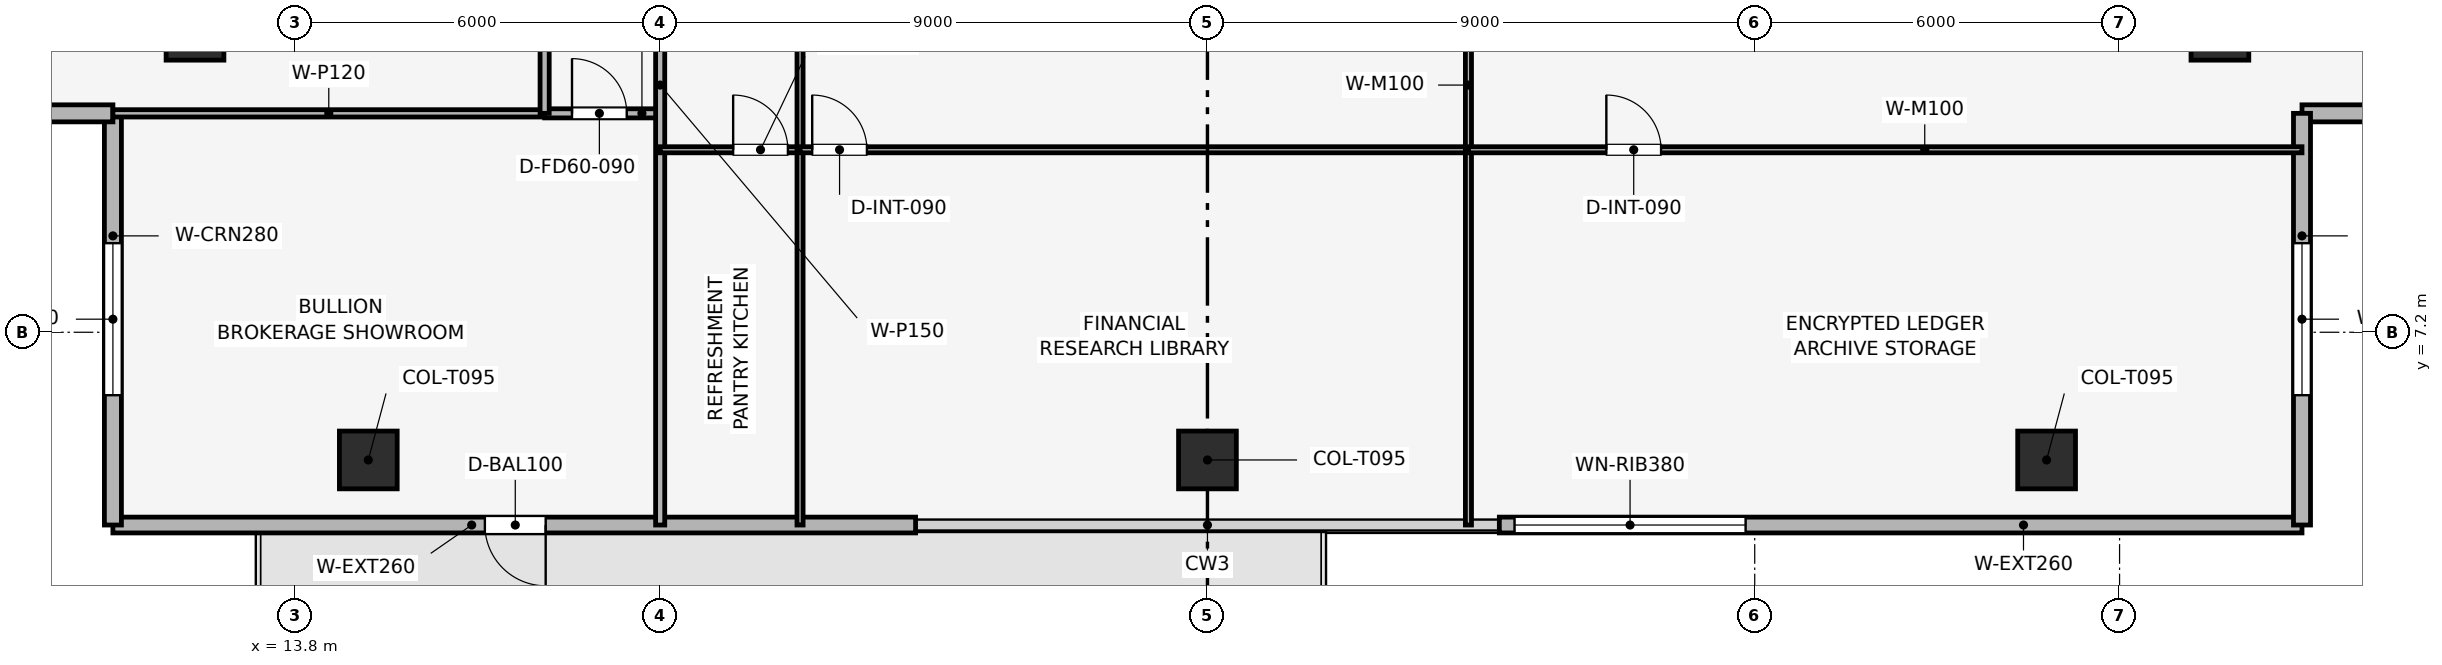
"""IFC4 building model, lengths in metres.
Left out: names, types, materials, properties, quantities, classifications, styles, units other than length and angle.
Written with IfcOpenShell. Run it as: python <this file> out.ifc"""

import sys

from ifc_helpers import new_model, si_unit, direction, frame, frame_2d, origin, origin_2d, place, context, subcontext, project, spatial, rectangle, extrude, element, fill, save


model = new_model("IFC4")
c1 = context("Model", 3, precision=1e-05, world=origin(), true_north=direction((0.0, 1.0)))
c2 = subcontext(c1, "Body", "Model", "MODEL_VIEW")
j1 = project(units=[si_unit("LENGTHUNIT", "METRE"), si_unit("PLANEANGLEUNIT", "RADIAN")], contexts=[c1])
p1 = place(None, origin())
s1 = spatial("IfcSite", under=j1, at=p1, CompositionType="ELEMENT")
p2 = place(p1, origin())
s2 = spatial("IfcBuilding", under=s1, at=p2, CompositionType="ELEMENT")
p3 = place(p2, frame((0.0, 0.0, 265.35)))
s3 = spatial("IfcBuildingStorey", under=s2, at=p3, CompositionType="ELEMENT", Elevation=265.35)
for number, where, z_axis, x_axis in (
    (1, (15.0, 5.1, 0.003), (0.0, 0.0, 1.0), (1.0, 0.0, 0.0)),
    (2, (28.8, 5.1, 0.003), (0.0, 0.0, 1.0), (1.0, 0.0, 0.0)),
    (3, (42.6, 5.1, 0.003), (0.0, 0.0, 1.0), (1.0, 0.0, 0.0)),
    (4, (12.15, 12.15, 0.003), (0.0, 0.0, 1.0), (1.0, 0.0, 0.0)),
    (5, (45.45, 12.15, 0.003), (0.0, 0.0, 1.0), (1.0, 0.0, 0.0)),
):
    element("IfcColumn", number, at=place(p3, frame(where, z_axis=z_axis, x_axis=x_axis)), inside=s3, PredefinedType="COLUMN", context=c2, shape_type="SweptSolid", body=[
        extrude(rectangle(XDim=0.95, YDim=0.95, at=origin_2d()), origin(), (0.0, 0.0, 1.0), 3.494),
    ])
p4 = place(p3, frame((46.8, 4.03, 0.0), z_axis=(0.0, 0.0, 1.0), x_axis=(-1.0, 0.0, 0.0)))
e6 = element("IfcWall", 6, at=p4, inside=s3, PredefinedType="SOLIDWALL", context=c2, shape_type="SweptSolid", body=[
    extrude(rectangle(XDim=13.2, YDim=0.26, at=frame_2d((6.6, 0.0))), origin(), (0.0, 0.0, 1.0), 3.5),
])
p5 = place(p4, frame((9.15, 0.0, 0.9)))
e7 = element("IfcOpeningElement", 7, at=p5, cuts=e6, PredefinedType="OPENING", context=c2, shape_type="SweptSolid", body=[
    extrude(rectangle(XDim=3.8, YDim=1.9, at=frame_2d((1.9, 0.95))), frame((0.0, 0.14, 0.0), z_axis=(0.0, -1.0, 0.0), x_axis=(1.0, 0.0, 0.0)), (0.0, 0.0, 1.0), 0.28),
])
p6 = place(p3, frame((24.0, 4.03, 0.0), z_axis=(0.0, 0.0, 1.0), x_axis=(-1.0, 0.0, 0.0)))
e8 = element("IfcWall", 8, at=p6, inside=s3, PredefinedType="SOLIDWALL", context=c2, shape_type="SweptSolid", body=[
    extrude(rectangle(XDim=13.2, YDim=0.26, at=frame_2d((6.6, 0.0))), origin(), (0.0, 0.0, 1.0), 3.5),
])
p7 = place(p6, frame((6.083, 0.0, 0.0)))
e9 = element("IfcOpeningElement", 9, at=p7, cuts=e8, PredefinedType="OPENING", context=c2, shape_type="SweptSolid", body=[
    extrude(rectangle(XDim=1.0, YDim=2.2, at=frame_2d((0.5, 1.1))), frame((0.0, 0.14, 0.0), z_axis=(0.0, -1.0, 0.0), x_axis=(1.0, 0.0, 0.0)), (0.0, 0.0, 1.0), 0.28),
])
p8 = place(p3, frame((10.8, 4.03, 0.0), z_axis=(0.0, 0.0, 1.0), x_axis=(0.0, 1.0, 0.0)))
e10 = element("IfcWall", 10, at=p8, inside=s3, PredefinedType="SOLIDWALL", context=c2, shape_type="SweptSolid", body=[
    extrude(rectangle(XDim=6.77, YDim=0.28, at=frame_2d((3.385, 0.0))), origin(), (0.0, 0.0, 1.0), 3.5),
])
p9 = place(p8, frame((2.135, 0.0, 0.9)))
e11 = element("IfcOpeningElement", 11, at=p9, cuts=e10, PredefinedType="OPENING", context=c2, shape_type="SweptSolid", body=[
    extrude(rectangle(XDim=2.5, YDim=1.9, at=frame_2d((1.25, 0.95))), frame((0.0, 0.15, 0.0), z_axis=(0.0, -1.0, 0.0), x_axis=(1.0, 0.0, 0.0)), (0.0, 0.0, 1.0), 0.3),
])
p10 = place(p3, frame((10.8, 10.8, 0.0), z_axis=(0.0, 0.0, 1.0), x_axis=(-1.0, 0.0, 0.0)))
e12 = element("IfcWall", 12, at=p10, inside=s3, PredefinedType="SOLIDWALL", context=c2, shape_type="SweptSolid", body=[
    extrude(rectangle(XDim=6.77, YDim=0.28, at=frame_2d((3.385, 0.0))), origin(), (0.0, 0.0, 1.0), 3.5),
])
p11 = place(p10, frame((2.135, 0.0, 0.9)))
e13 = element("IfcOpeningElement", 13, at=p11, cuts=e12, PredefinedType="OPENING", context=c2, shape_type="SweptSolid", body=[
    extrude(rectangle(XDim=2.5, YDim=1.9, at=frame_2d((1.25, 0.95))), frame((0.0, 0.15, 0.0), z_axis=(0.0, -1.0, 0.0), x_axis=(1.0, 0.0, 0.0)), (0.0, 0.0, 1.0), 0.3),
])
p12 = place(p3, frame((53.57, 10.8, 0.0), z_axis=(0.0, 0.0, 1.0), x_axis=(-1.0, 0.0, 0.0)))
e14 = element("IfcWall", 14, at=p12, inside=s3, PredefinedType="SOLIDWALL", context=c2, shape_type="SweptSolid", body=[
    extrude(rectangle(XDim=6.77, YDim=0.28, at=frame_2d((3.385, 0.0))), origin(), (0.0, 0.0, 1.0), 3.5),
])
p13 = place(p12, frame((2.135, 0.0, 0.9)))
e15 = element("IfcOpeningElement", 15, at=p13, cuts=e14, PredefinedType="OPENING", context=c2, shape_type="SweptSolid", body=[
    extrude(rectangle(XDim=2.5, YDim=1.9, at=frame_2d((1.25, 0.95))), frame((0.0, 0.15, 0.0), z_axis=(0.0, -1.0, 0.0), x_axis=(1.0, 0.0, 0.0)), (0.0, 0.0, 1.0), 0.3),
])
p14 = place(p3, frame((46.8, 10.8, 0.0), z_axis=(0.0, 0.0, 1.0), x_axis=(0.0, -1.0, 0.0)))
e16 = element("IfcWall", 16, at=p14, inside=s3, PredefinedType="SOLIDWALL", context=c2, shape_type="SweptSolid", body=[
    extrude(rectangle(XDim=6.77, YDim=0.28, at=frame_2d((3.385, 0.0))), origin(), (0.0, 0.0, 1.0), 3.5),
])
p15 = place(p14, frame((2.135, 0.0, 0.9)))
e17 = element("IfcOpeningElement", 17, at=p15, cuts=e16, PredefinedType="OPENING", context=c2, shape_type="SweptSolid", body=[
    extrude(rectangle(XDim=2.5, YDim=1.9, at=frame_2d((1.25, 0.95))), frame((0.0, 0.15, 0.0), z_axis=(0.0, -1.0, 0.0), x_axis=(1.0, 0.0, 0.0)), (0.0, 0.0, 1.0), 0.3),
])
p16 = place(p3, frame((10.8, 10.8, 0.0), z_axis=(0.0, 0.0, 1.0), x_axis=(1.0, 0.0, 0.0)))
e18 = element("IfcWall", 18, at=p16, inside=s3, PredefinedType="PARTITIONING", context=c2, shape_type="SweptSolid", body=[
    extrude(rectangle(XDim=7.1, YDim=0.12, at=frame_2d((3.55, 0.0))), origin(), (0.0, 0.0, 1.0), 3.085),
])
p17 = place(p3, frame((17.9, 10.8, 0.0), z_axis=(0.0, 0.0, 1.0), x_axis=(1.0, 0.0, 0.0)))
e19 = element("IfcWall", 19, at=p17, inside=s3, PredefinedType="PARTITIONING", context=c2, shape_type="SweptSolid", body=[
    extrude(rectangle(XDim=1.9, YDim=0.15, at=frame_2d((0.95, 0.0))), origin(), (0.0, 0.0, 1.0), 3.5),
])
p18 = place(p17, frame((0.45, 0.0, 0.0)))
e20 = element("IfcOpeningElement", 20, at=p18, cuts=e19, PredefinedType="OPENING", context=c2, shape_type="SweptSolid", body=[
    extrude(rectangle(XDim=0.9, YDim=2.1, at=frame_2d((0.45, 1.05))), frame((0.0, 0.085, 0.0), z_axis=(0.0, -1.0, 0.0), x_axis=(1.0, 0.0, 0.0)), (0.0, 0.0, 1.0), 0.17),
])
p19 = place(p3, frame((19.8, 4.03, 0.0), z_axis=(0.0, 0.0, 1.0), x_axis=(0.0, 1.0, 0.0)))
e21 = element("IfcWall", 21, at=p19, inside=s3, PredefinedType="PARTITIONING", context=c2, shape_type="SweptSolid", body=[
    extrude(rectangle(XDim=15.77, YDim=0.15, at=frame_2d((7.885, 0.0))), origin(), (0.0, 0.0, 1.0), 3.085),
])
p20 = place(p19, frame((10.82, 0.0, 0.0)))
e22 = element("IfcOpeningElement", 22, at=p20, cuts=e21, PredefinedType="OPENING", context=c2, shape_type="SweptSolid", body=[
    extrude(rectangle(XDim=0.9, YDim=2.1, at=frame_2d((0.45, 1.05))), frame((0.0, 0.085, 0.0), z_axis=(0.0, -1.0, 0.0), x_axis=(1.0, 0.0, 0.0)), (0.0, 0.0, 1.0), 0.17),
])
p21 = place(p3, frame((19.8, 10.201, 0.0), z_axis=(0.0, 0.0, 1.0), x_axis=(1.0, 0.0, 0.0)))
e23 = element("IfcWall", 23, at=p21, inside=s3, PredefinedType="MOVABLE", context=c2, shape_type="SweptSolid", body=[
    extrude(rectangle(XDim=2.3, YDim=0.1, at=frame_2d((1.15, 0.0))), origin(), (0.0, 0.0, 1.0), 3.085),
])
p22 = place(p21, frame((1.2, 0.0, 0.0)))
e24 = element("IfcOpeningElement", 24, at=p22, cuts=e23, PredefinedType="OPENING", context=c2, shape_type="SweptSolid", body=[
    extrude(rectangle(XDim=0.9, YDim=2.1, at=frame_2d((0.45, 1.05))), frame((0.0, 0.06, 0.0), z_axis=(0.0, -1.0, 0.0), x_axis=(1.0, 0.0, 0.0)), (0.0, 0.0, 1.0), 0.12),
])
p23 = place(p3, frame((22.1, 4.03, 0.0), z_axis=(0.0, 0.0, 1.0), x_axis=(0.0, 1.0, 0.0)))
e25 = element("IfcWall", 25, at=p23, inside=s3, PredefinedType="MOVABLE", context=c2, shape_type="SweptSolid", body=[
    extrude(rectangle(XDim=15.77, YDim=0.1, at=frame_2d((7.885, 0.0))), origin(), (0.0, 0.0, 1.0), 3.085),
])
p24 = place(p23, frame((13.37, 0.0, 0.0)))
e26 = element("IfcOpeningElement", 26, at=p24, cuts=e25, PredefinedType="OPENING", context=c2, shape_type="SweptSolid", body=[
    extrude(rectangle(XDim=0.9, YDim=2.1, at=frame_2d((0.45, 1.05))), frame((0.0, 0.06, 0.0), z_axis=(0.0, -1.0, 0.0), x_axis=(1.0, 0.0, 0.0)), (0.0, 0.0, 1.0), 0.12),
])
p25 = place(p3, frame((22.1, 10.201, 0.0), z_axis=(0.0, 0.0, 1.0), x_axis=(1.0, 0.0, 0.0)))
e27 = element("IfcWall", 27, at=p25, inside=s3, PredefinedType="MOVABLE", context=c2, shape_type="SweptSolid", body=[
    extrude(rectangle(XDim=10.992, YDim=0.1, at=frame_2d((5.496, 0.0))), origin(), (0.0, 0.0, 1.0), 3.085),
])
p26 = place(p25, frame((0.2, 0.0, 0.0)))
e28 = element("IfcOpeningElement", 28, at=p26, cuts=e27, PredefinedType="OPENING", context=c2, shape_type="SweptSolid", body=[
    extrude(rectangle(XDim=0.9, YDim=2.1, at=frame_2d((0.45, 1.05))), frame((0.0, 0.06, 0.0), z_axis=(0.0, -1.0, 0.0), x_axis=(1.0, 0.0, 0.0)), (0.0, 0.0, 1.0), 0.12),
])
p27 = place(p3, frame((33.092, 4.03, 0.0), z_axis=(0.0, 0.0, 1.0), x_axis=(0.0, 1.0, 0.0)))
e29 = element("IfcWall", 29, at=p27, inside=s3, PredefinedType="MOVABLE", context=c2, shape_type="SweptSolid", body=[
    extrude(rectangle(XDim=15.77, YDim=0.1, at=frame_2d((7.885, 0.0))), origin(), (0.0, 0.0, 1.0), 3.085),
])
p28 = place(p27, frame((13.37, 0.0, 0.0)))
e30 = element("IfcOpeningElement", 30, at=p28, cuts=e29, PredefinedType="OPENING", context=c2, shape_type="SweptSolid", body=[
    extrude(rectangle(XDim=0.9, YDim=2.1, at=frame_2d((0.45, 1.05))), frame((0.0, 0.06, 0.0), z_axis=(0.0, -1.0, 0.0), x_axis=(1.0, 0.0, 0.0)), (0.0, 0.0, 1.0), 0.12),
])
p29 = place(p3, frame((33.092, 10.201, 0.0), z_axis=(0.0, 0.0, 1.0), x_axis=(1.0, 0.0, 0.0)))
e31 = element("IfcWall", 31, at=p29, inside=s3, PredefinedType="MOVABLE", context=c2, shape_type="SweptSolid", body=[
    extrude(rectangle(XDim=13.708, YDim=0.1, at=frame_2d((6.854, 0.0))), origin(), (0.0, 0.0, 1.0), 3.085),
])
p30 = place(p29, frame((2.268, 0.0, 0.0)))
e32 = element("IfcOpeningElement", 32, at=p30, cuts=e31, PredefinedType="OPENING", context=c2, shape_type="SweptSolid", body=[
    extrude(rectangle(XDim=0.9, YDim=2.1, at=frame_2d((0.45, 1.05))), frame((0.0, 0.06, 0.0), z_axis=(0.0, -1.0, 0.0), x_axis=(1.0, 0.0, 0.0)), (0.0, 0.0, 1.0), 0.12),
])
p31 = place(p3, frame((17.9, 10.8, 0.0), z_axis=(0.0, 0.0, 1.0), x_axis=(0.0, 1.0, 0.0)))
e33 = element("IfcWall", 33, at=p31, inside=s3, PredefinedType="PARTITIONING", context=c2, shape_type="SweptSolid", body=[
    extrude(rectangle(XDim=28.9, YDim=0.15, at=frame_2d((14.45, 0.0))), origin(), (0.0, 0.0, 1.0), 3.085),
])
p32 = place(p31, frame((14.0, 0.0, 0.0)))
e34 = element("IfcOpeningElement", 34, at=p32, cuts=e33, PredefinedType="OPENING", context=c2, shape_type="SweptSolid", body=[
    extrude(rectangle(XDim=0.9, YDim=2.1, at=frame_2d((0.45, 1.05))), frame((0.0, 0.085, 0.0), z_axis=(0.0, -1.0, 0.0), x_axis=(1.0, 0.0, 0.0)), (0.0, 0.0, 1.0), 0.17),
])
p33 = place(p7, origin())
e35 = element("IfcDoor", 35, at=p33, inside=s3, OperationType="SINGLE_SWING_LEFT", PredefinedType="DOOR", context=c2, shape_type="SweptSolid", body=[
    extrude(rectangle(XDim=1.0, YDim=2.2, at=frame_2d((0.5, 1.1))), frame((0.0, 0.025, 0.0), z_axis=(0.0, -1.0, 0.0), x_axis=(1.0, 0.0, 0.0)), (0.0, 0.0, 1.0), 0.05),
])
fill(e9, e35)
p34 = place(p5, origin())
e36 = element("IfcWindow", 36, at=p34, inside=s3, PartitioningType="SINGLE_PANEL", PredefinedType="WINDOW", context=c2, shape_type="SweptSolid", body=[
    extrude(rectangle(XDim=3.8, YDim=1.9, at=frame_2d((1.9, 0.95))), frame((0.0, 0.03, 0.0), z_axis=(0.0, -1.0, 0.0), x_axis=(1.0, 0.0, 0.0)), (0.0, 0.0, 1.0), 0.06),
])
fill(e7, e36)
p35 = place(p9, origin())
e37 = element("IfcWindow", 37, at=p35, inside=s3, PartitioningType="SINGLE_PANEL", PredefinedType="WINDOW", context=c2, shape_type="SweptSolid", body=[
    extrude(rectangle(XDim=2.5, YDim=1.9, at=frame_2d((1.25, 0.95))), frame((0.0, 0.03, 0.0), z_axis=(0.0, -1.0, 0.0), x_axis=(1.0, 0.0, 0.0)), (0.0, 0.0, 1.0), 0.06),
])
fill(e11, e37)
p36 = place(p15, origin())
e38 = element("IfcWindow", 38, at=p36, inside=s3, PartitioningType="SINGLE_PANEL", PredefinedType="WINDOW", context=c2, shape_type="SweptSolid", body=[
    extrude(rectangle(XDim=2.5, YDim=1.9, at=frame_2d((1.25, 0.95))), frame((0.0, 0.03, 0.0), z_axis=(0.0, -1.0, 0.0), x_axis=(1.0, 0.0, 0.0)), (0.0, 0.0, 1.0), 0.06),
])
fill(e17, e38)
p37 = place(p18, origin())
e39 = element("IfcDoor", 39, at=p37, inside=s3, OperationType="SINGLE_SWING_LEFT", PredefinedType="DOOR", context=c2, shape_type="SweptSolid", body=[
    extrude(rectangle(XDim=0.9, YDim=2.1, at=frame_2d((0.45, 1.05))), frame((0.0, 0.025, 0.0), z_axis=(0.0, -1.0, 0.0), x_axis=(1.0, 0.0, 0.0)), (0.0, 0.0, 1.0), 0.05),
])
fill(e20, e39)
p38 = place(p22, origin())
e40 = element("IfcDoor", 40, at=p38, inside=s3, OperationType="SINGLE_SWING_LEFT", PredefinedType="DOOR", context=c2, shape_type="SweptSolid", body=[
    extrude(rectangle(XDim=0.9, YDim=2.1, at=frame_2d((0.45, 1.05))), frame((0.0, 0.025, 0.0), z_axis=(0.0, -1.0, 0.0), x_axis=(1.0, 0.0, 0.0)), (0.0, 0.0, 1.0), 0.05),
])
fill(e24, e40)
p39 = place(p26, origin())
e41 = element("IfcDoor", 41, at=p39, inside=s3, OperationType="SINGLE_SWING_LEFT", PredefinedType="DOOR", context=c2, shape_type="SweptSolid", body=[
    extrude(rectangle(XDim=0.9, YDim=2.1, at=frame_2d((0.45, 1.05))), frame((0.0, 0.025, 0.0), z_axis=(0.0, -1.0, 0.0), x_axis=(1.0, 0.0, 0.0)), (0.0, 0.0, 1.0), 0.05),
])
fill(e28, e41)
p40 = place(p30, origin())
e42 = element("IfcDoor", 42, at=p40, inside=s3, OperationType="SINGLE_SWING_LEFT", PredefinedType="DOOR", context=c2, shape_type="SweptSolid", body=[
    extrude(rectangle(XDim=0.9, YDim=2.1, at=frame_2d((0.45, 1.05))), frame((0.0, 0.025, 0.0), z_axis=(0.0, -1.0, 0.0), x_axis=(1.0, 0.0, 0.0)), (0.0, 0.0, 1.0), 0.05),
])
fill(e32, e42)
save(model, sys.argv[1])
